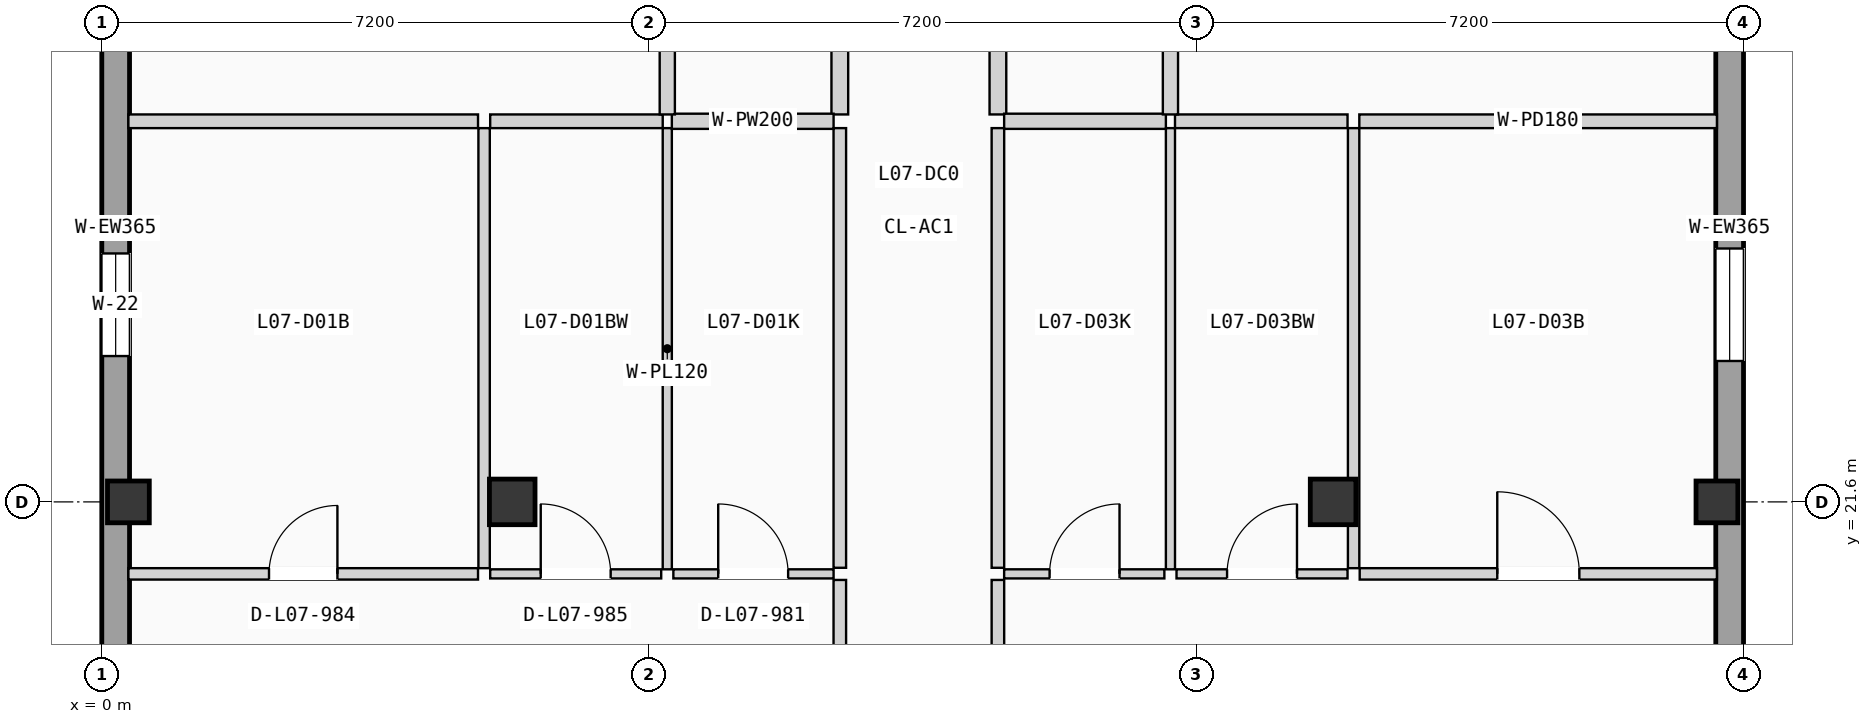
"""IFC4 building model, lengths in metres.
Left out: names, types, materials, properties, quantities, classifications, styles, units other than length and angle.
Written with IfcOpenShell. Run it as: python <this file> out.ifc"""

import sys

from ifc_helpers import new_model, si_unit, direction, frame, frame_2d, origin, origin_2d, place, context, subcontext, project, spatial, rectangle, extrude, element, fill, save


model = new_model("IFC4")
c1 = context("Model", 3, precision=1e-05, world=origin(), true_north=direction((0.0, 1.0)))
c2 = subcontext(c1, "Body", "Model", "MODEL_VIEW")
j1 = project(units=[si_unit("LENGTHUNIT", "METRE"), si_unit("PLANEANGLEUNIT", "RADIAN")], contexts=[c1])
p1 = place(None, origin())
s1 = spatial("IfcSite", under=j1, at=p1, CompositionType="ELEMENT")
p2 = place(p1, origin())
s2 = spatial("IfcBuilding", under=s1, at=p2, CompositionType="ELEMENT")
p3 = place(p2, frame((0.0, 0.0, 24.675)))
s3 = spatial("IfcBuildingStorey", under=s2, at=p3, CompositionType="ELEMENT", Elevation=24.675)
p4 = place(p3, frame((0.35, 21.6, 0.0), z_axis=(0.0, 0.0, 1.0), x_axis=(1.0, 0.0, 0.0)))
e1 = element("IfcColumn", 1, at=p4, inside=s3, PredefinedType="COLUMN", context=c2, shape_type="SweptSolid", body=[
    extrude(rectangle(XDim=0.55, YDim=0.55, at=origin_2d()), origin(), (0.0, 0.0, 1.0), 3.15),
])
for number, where, z_axis, x_axis in (
    (2, (5.4, 21.6, 0.0), (0.0, 0.0, 1.0), (1.0, 0.0, 0.0)),
    (3, (16.2, 21.6, 0.0), (0.0, 0.0, 1.0), (1.0, 0.0, 0.0)),
):
    element("IfcColumn", number, at=place(p3, frame(where, z_axis=z_axis, x_axis=x_axis)), inside=s3, PredefinedType="COLUMN", context=c2, shape_type="SweptSolid", body=[
        extrude(rectangle(XDim=0.6, YDim=0.6, at=origin_2d()), origin(), (0.0, 0.0, 1.0), 3.15),
    ])
p5 = place(p3, frame((21.25, 21.6, 0.0), z_axis=(0.0, 0.0, 1.0), x_axis=(1.0, 0.0, 0.0)))
e4 = element("IfcColumn", 4, at=p5, inside=s3, PredefinedType="COLUMN", context=c2, shape_type="SweptSolid", body=[
    extrude(rectangle(XDim=0.55, YDim=0.55, at=origin_2d()), origin(), (0.0, 0.0, 1.0), 3.15),
])
p6 = place(p3, frame((0.183, 0.365, 0.0), z_axis=(0.0, 0.0, 1.0), x_axis=(0.0, 1.0, 0.0)))
e5 = element("IfcWall", 5, at=p6, inside=s3, PredefinedType="SOLIDWALL", context=c2, shape_type="SweptSolid", body=[
    extrude(rectangle(XDim=49.67, YDim=0.365, at=frame_2d((24.835, 0.0))), origin(), (0.0, 0.0, 1.0), 2.6),
])
p7 = place(p6, frame((16.782, 0.0, 0.85)))
e6 = element("IfcOpeningElement", 6, at=p7, cuts=e5, PredefinedType="OPENING", context=c2, shape_type="SweptSolid", body=[
    extrude(rectangle(XDim=0.95, YDim=1.2, at=frame_2d((0.475, 0.6))), frame((0.0, 0.192, 0.0), z_axis=(0.0, -1.0, 0.0), x_axis=(1.0, 0.0, 0.0)), (0.0, 0.0, 1.0), 0.385),
])
p8 = place(p6, frame((9.452, 0.0, 0.9)))
e7 = element("IfcOpeningElement", 7, at=p8, cuts=e5, PredefinedType="OPENING", context=c2, shape_type="SweptSolid", body=[
    extrude(rectangle(XDim=1.35, YDim=1.2, at=frame_2d((0.675, 0.6))), frame((0.0, 0.192, 0.0), z_axis=(0.0, -1.0, 0.0), x_axis=(1.0, 0.0, 0.0)), (0.0, 0.0, 1.0), 0.385),
])
p9 = place(p6, frame((23.154, 0.0, 0.815)))
e8 = element("IfcOpeningElement", 8, at=p9, cuts=e5, PredefinedType="OPENING", context=c2, shape_type="SweptSolid", body=[
    extrude(rectangle(XDim=1.35, YDim=1.35, at=frame_2d((0.675, 0.675))), frame((0.0, 0.192, 0.0), z_axis=(0.0, -1.0, 0.0), x_axis=(1.0, 0.0, 0.0)), (0.0, 0.0, 1.0), 0.385),
])
p10 = place(p6, frame((32.71, 0.0, 0.665)))
e9 = element("IfcOpeningElement", 9, at=p10, cuts=e5, PredefinedType="OPENING", context=c2, shape_type="SweptSolid", body=[
    extrude(rectangle(XDim=1.35, YDim=1.5, at=frame_2d((0.675, 0.75))), frame((0.0, 0.192, 0.0), z_axis=(0.0, -1.0, 0.0), x_axis=(1.0, 0.0, 0.0)), (0.0, 0.0, 1.0), 0.385),
])
p11 = place(p6, frame((29.3, 0.0, 0.515)))
e10 = element("IfcOpeningElement", 10, at=p11, cuts=e5, PredefinedType="OPENING", context=c2, shape_type="SweptSolid", body=[
    extrude(rectangle(XDim=1.35, YDim=1.65, at=frame_2d((0.675, 0.825))), frame((0.0, 0.192, 0.0), z_axis=(0.0, -1.0, 0.0), x_axis=(1.0, 0.0, 0.0)), (0.0, 0.0, 1.0), 0.385),
])
p12 = place(p6, frame((39.504, 0.0, 0.85)))
e11 = element("IfcOpeningElement", 11, at=p12, cuts=e5, PredefinedType="OPENING", context=c2, shape_type="SweptSolid", body=[
    extrude(rectangle(XDim=0.95, YDim=1.2, at=frame_2d((0.475, 0.6))), frame((0.0, 0.192, 0.0), z_axis=(0.0, -1.0, 0.0), x_axis=(1.0, 0.0, 0.0)), (0.0, 0.0, 1.0), 0.385),
])
p13 = place(p3, frame((21.417, 0.365, 0.0), z_axis=(0.0, 0.0, 1.0), x_axis=(0.0, 1.0, 0.0)))
e12 = element("IfcWall", 12, at=p13, inside=s3, PredefinedType="SOLIDWALL", context=c2, shape_type="SweptSolid", body=[
    extrude(rectangle(XDim=49.67, YDim=0.365, at=frame_2d((24.835, 0.0))), origin(), (0.0, 0.0, 1.0), 2.6),
])
p14 = place(p13, frame((16.517, 0.0, 0.9)))
e13 = element("IfcOpeningElement", 13, at=p14, cuts=e12, PredefinedType="OPENING", context=c2, shape_type="SweptSolid", body=[
    extrude(rectangle(XDim=1.48, YDim=1.2, at=frame_2d((0.74, 0.6))), frame((0.0, 0.192, 0.0), z_axis=(0.0, -1.0, 0.0), x_axis=(1.0, 0.0, 0.0)), (0.0, 0.0, 1.0), 0.385),
])
p15 = place(p13, frame((9.387, 0.0, 0.815)))
e14 = element("IfcOpeningElement", 14, at=p15, cuts=e12, PredefinedType="OPENING", context=c2, shape_type="SweptSolid", body=[
    extrude(rectangle(XDim=1.48, YDim=1.35, at=frame_2d((0.74, 0.675))), frame((0.0, 0.192, 0.0), z_axis=(0.0, -1.0, 0.0), x_axis=(1.0, 0.0, 0.0)), (0.0, 0.0, 1.0), 0.385),
])
p16 = place(p13, frame((23.089, 0.0, 0.665)))
e15 = element("IfcOpeningElement", 15, at=p16, cuts=e12, PredefinedType="OPENING", context=c2, shape_type="SweptSolid", body=[
    extrude(rectangle(XDim=1.48, YDim=1.5, at=frame_2d((0.74, 0.75))), frame((0.0, 0.192, 0.0), z_axis=(0.0, -1.0, 0.0), x_axis=(1.0, 0.0, 0.0)), (0.0, 0.0, 1.0), 0.385),
])
p17 = place(p13, frame((32.645, 0.0, 0.515)))
e16 = element("IfcOpeningElement", 16, at=p17, cuts=e12, PredefinedType="OPENING", context=c2, shape_type="SweptSolid", body=[
    extrude(rectangle(XDim=1.48, YDim=1.65, at=frame_2d((0.74, 0.825))), frame((0.0, 0.192, 0.0), z_axis=(0.0, -1.0, 0.0), x_axis=(1.0, 0.0, 0.0)), (0.0, 0.0, 1.0), 0.385),
])
p18 = place(p13, frame((29.5, 0.0, 0.85)))
e17 = element("IfcOpeningElement", 17, at=p18, cuts=e12, PredefinedType="OPENING", context=c2, shape_type="SweptSolid", body=[
    extrude(rectangle(XDim=0.95, YDim=1.2, at=frame_2d((0.475, 0.6))), frame((0.0, 0.192, 0.0), z_axis=(0.0, -1.0, 0.0), x_axis=(1.0, 0.0, 0.0)), (0.0, 0.0, 1.0), 0.385),
])
p19 = place(p13, frame((39.179, 0.0, 0.9)))
e18 = element("IfcOpeningElement", 18, at=p19, cuts=e12, PredefinedType="OPENING", context=c2, shape_type="SweptSolid", body=[
    extrude(rectangle(XDim=1.6, YDim=1.2, at=frame_2d((0.8, 0.6))), frame((0.0, 0.192, 0.0), z_axis=(0.0, -1.0, 0.0), x_axis=(1.0, 0.0, 0.0)), (0.0, 0.0, 1.0), 0.385),
])
p20 = place(p3, frame((9.71, 13.545, 0.0), z_axis=(0.0, 0.0, 1.0), x_axis=(0.0, 1.0, 0.0)))
e19 = element("IfcWall", 19, at=p20, inside=s3, PredefinedType="PARTITIONING", context=c2, shape_type="SweptSolid", body=[
    extrude(rectangle(XDim=7.028, YDim=0.165, at=frame_2d((3.514, 0.0))), origin(), (0.0, 0.0, 1.0), 2.87),
])
p21 = place(p20, frame((3.009, 0.0, 0.0)))
e20 = element("IfcOpeningElement", 20, at=p21, cuts=e19, PredefinedType="OPENING", context=c2, shape_type="SweptSolid", body=[
    extrude(rectangle(XDim=1.01, YDim=2.11, at=frame_2d((0.505, 1.055))), frame((0.0, 0.093, 0.0), z_axis=(0.0, -1.0, 0.0), x_axis=(1.0, 0.0, 0.0)), (0.0, 0.0, 1.0), 0.185),
])
p22 = place(p3, frame((9.71, 20.733, 0.0), z_axis=(0.0, 0.0, 1.0), x_axis=(0.0, 1.0, 0.0)))
e21 = element("IfcWall", 21, at=p22, inside=s3, PredefinedType="PARTITIONING", context=c2, shape_type="SweptSolid", body=[
    extrude(rectangle(XDim=5.785, YDim=0.165, at=frame_2d((2.893, 0.0))), origin(), (0.0, 0.0, 1.0), 2.87),
])
p23 = place(p3, frame((9.71, 26.698, 0.0), z_axis=(0.0, 0.0, 1.0), x_axis=(0.0, 1.0, 0.0)))
e22 = element("IfcWall", 22, at=p23, inside=s3, PredefinedType="PLUMBINGWALL", context=c2, shape_type="SweptSolid", body=[
    extrude(rectangle(XDim=4.912, YDim=0.22, at=frame_2d((2.456, 0.0))), origin(), (0.0, 0.0, 1.0), 2.87),
])
p24 = place(p3, frame((11.79, 13.545, 0.0), z_axis=(0.0, 0.0, 1.0), x_axis=(0.0, 1.0, 0.0)))
e23 = element("IfcWall", 23, at=p24, inside=s3, PredefinedType="PARTITIONING", context=c2, shape_type="SweptSolid", body=[
    extrude(rectangle(XDim=7.028, YDim=0.165, at=frame_2d((3.514, 0.0))), origin(), (0.0, 0.0, 1.0), 2.87),
])
p25 = place(p24, frame((3.009, 0.0, 0.0)))
e24 = element("IfcOpeningElement", 24, at=p25, cuts=e23, PredefinedType="OPENING", context=c2, shape_type="SweptSolid", body=[
    extrude(rectangle(XDim=1.01, YDim=2.11, at=frame_2d((0.505, 1.055))), frame((0.0, 0.093, 0.0), z_axis=(0.0, -1.0, 0.0), x_axis=(1.0, 0.0, 0.0)), (0.0, 0.0, 1.0), 0.185),
])
p26 = place(p3, frame((11.79, 20.733, 0.0), z_axis=(0.0, 0.0, 1.0), x_axis=(0.0, 1.0, 0.0)))
e25 = element("IfcWall", 25, at=p26, inside=s3, PredefinedType="PARTITIONING", context=c2, shape_type="SweptSolid", body=[
    extrude(rectangle(XDim=5.785, YDim=0.165, at=frame_2d((2.893, 0.0))), origin(), (0.0, 0.0, 1.0), 2.87),
])
p27 = place(p3, frame((11.79, 26.698, 0.0), z_axis=(0.0, 0.0, 1.0), x_axis=(0.0, 1.0, 0.0)))
e26 = element("IfcWall", 26, at=p27, inside=s3, PredefinedType="PLUMBINGWALL", context=c2, shape_type="SweptSolid", body=[
    extrude(rectangle(XDim=4.912, YDim=0.22, at=frame_2d((2.456, 0.0))), origin(), (0.0, 0.0, 1.0), 2.87),
])
p28 = place(p3, frame((7.52, 20.653, 0.0), z_axis=(0.0, 0.0, 1.0), x_axis=(1.0, 0.0, 0.0)))
e27 = element("IfcWall", 27, at=p28, inside=s3, PredefinedType="PARTITIONING", context=c2, shape_type="SweptSolid", body=[
    extrude(rectangle(XDim=2.108, YDim=0.12, at=frame_2d((1.054, 0.0))), origin(), (0.0, 0.0, 1.0), 2.87),
])
p29 = place(p28, frame((0.59, 0.0, 0.0)))
e28 = element("IfcOpeningElement", 28, at=p29, cuts=e27, PredefinedType="OPENING", context=c2, shape_type="SweptSolid", body=[
    extrude(rectangle(XDim=0.92, YDim=2.02, at=frame_2d((0.46, 1.01))), frame((0.0, 0.07, 0.0), z_axis=(0.0, -1.0, 0.0), x_axis=(1.0, 0.0, 0.0)), (0.0, 0.0, 1.0), 0.14),
])
p30 = place(p3, frame((0.35, 20.653, 0.0), z_axis=(0.0, 0.0, 1.0), x_axis=(1.0, 0.0, 0.0)))
e29 = element("IfcWall", 29, at=p30, inside=s3, PredefinedType="PARTITIONING", context=c2, shape_type="SweptSolid", body=[
    extrude(rectangle(XDim=4.6, YDim=0.15, at=frame_2d((2.3, 0.0))), origin(), (0.0, 0.0, 1.0), 2.87),
])
p31 = place(p30, frame((1.85, 0.0, 0.0)))
e30 = element("IfcOpeningElement", 30, at=p31, cuts=e29, PredefinedType="OPENING", context=c2, shape_type="SweptSolid", body=[
    extrude(rectangle(XDim=0.9, YDim=2.04, at=frame_2d((0.45, 1.02))), frame((0.0, 0.085, 0.0), z_axis=(0.0, -1.0, 0.0), x_axis=(1.0, 0.0, 0.0)), (0.0, 0.0, 1.0), 0.17),
])
p32 = place(p3, frame((5.11, 20.653, 0.0), z_axis=(0.0, 0.0, 1.0), x_axis=(1.0, 0.0, 0.0)))
e31 = element("IfcWall", 31, at=p32, inside=s3, PredefinedType="PARTITIONING", context=c2, shape_type="SweptSolid", body=[
    extrude(rectangle(XDim=2.25, YDim=0.12, at=frame_2d((1.125, 0.0))), origin(), (0.0, 0.0, 1.0), 2.87),
])
p33 = place(p32, frame((0.665, 0.0, 0.0)))
e32 = element("IfcOpeningElement", 32, at=p33, cuts=e31, PredefinedType="OPENING", context=c2, shape_type="SweptSolid", body=[
    extrude(rectangle(XDim=0.92, YDim=2.02, at=frame_2d((0.46, 1.01))), frame((0.0, 0.07, 0.0), z_axis=(0.0, -1.0, 0.0), x_axis=(1.0, 0.0, 0.0)), (0.0, 0.0, 1.0), 0.14),
])
p34 = place(p3, frame((7.44, 20.713, 0.0), z_axis=(0.0, 0.0, 1.0), x_axis=(0.0, 1.0, 0.0)))
e33 = element("IfcWall", 33, at=p34, inside=s3, PredefinedType="PARTITIONING", context=c2, shape_type="SweptSolid", body=[
    extrude(rectangle(XDim=5.805, YDim=0.12, at=frame_2d((2.903, 0.0))), origin(), (0.0, 0.0, 1.0), 2.87),
])
p35 = place(p3, frame((7.5, 26.608, 0.0), z_axis=(0.0, 0.0, 1.0), x_axis=(1.0, 0.0, 0.0)))
e34 = element("IfcWall", 34, at=p35, inside=s3, PredefinedType="PLUMBINGWALL", context=c2, shape_type="SweptSolid", body=[
    extrude(rectangle(XDim=2.128, YDim=0.2, at=frame_2d((1.064, 0.0))), origin(), (0.0, 0.0, 1.0), 2.87),
])
p36 = place(p3, frame((5.03, 20.728, 0.0), z_axis=(0.0, 0.0, 1.0), x_axis=(0.0, 1.0, 0.0)))
e35 = element("IfcWall", 35, at=p36, inside=s3, PredefinedType="PARTITIONING", context=c2, shape_type="SweptSolid", body=[
    extrude(rectangle(XDim=5.79, YDim=0.15, at=frame_2d((2.895, 0.0))), origin(), (0.0, 0.0, 1.0), 2.87),
])
p37 = place(p3, frame((0.35, 26.608, 0.0), z_axis=(0.0, 0.0, 1.0), x_axis=(1.0, 0.0, 0.0)))
e36 = element("IfcWall", 36, at=p37, inside=s3, PredefinedType="PARTITIONING", context=c2, shape_type="SweptSolid", body=[
    extrude(rectangle(XDim=4.6, YDim=0.18, at=frame_2d((2.3, 0.0))), origin(), (0.0, 0.0, 1.0), 2.87),
])
p38 = place(p3, frame((5.11, 26.608, 0.0), z_axis=(0.0, 0.0, 1.0), x_axis=(1.0, 0.0, 0.0)))
e37 = element("IfcWall", 37, at=p38, inside=s3, PredefinedType="PARTITIONING", context=c2, shape_type="SweptSolid", body=[
    extrude(rectangle(XDim=2.27, YDim=0.18, at=frame_2d((1.135, 0.0))), origin(), (0.0, 0.0, 1.0), 2.87),
])
p39 = place(p3, frame((7.44, 26.698, 0.0), z_axis=(0.0, 0.0, 1.0), x_axis=(0.0, 1.0, 0.0)))
e38 = element("IfcWall", 38, at=p39, inside=s3, PredefinedType="PLUMBINGWALL", context=c2, shape_type="SweptSolid", body=[
    extrude(rectangle(XDim=4.917, YDim=0.2, at=frame_2d((2.458, 0.0))), origin(), (0.0, 0.0, 1.0), 2.87),
])
p40 = place(p3, frame((11.872, 20.653, 0.0), z_axis=(0.0, 0.0, 1.0), x_axis=(1.0, 0.0, 0.0)))
e39 = element("IfcWall", 39, at=p40, inside=s3, PredefinedType="PARTITIONING", context=c2, shape_type="SweptSolid", body=[
    extrude(rectangle(XDim=2.108, YDim=0.12, at=frame_2d((1.054, 0.0))), origin(), (0.0, 0.0, 1.0), 2.87),
])
p41 = place(p40, frame((0.598, 0.0, 0.0)))
e40 = element("IfcOpeningElement", 40, at=p41, cuts=e39, PredefinedType="OPENING", context=c2, shape_type="SweptSolid", body=[
    extrude(rectangle(XDim=0.92, YDim=2.02, at=frame_2d((0.46, 1.01))), frame((0.0, 0.07, 0.0), z_axis=(0.0, -1.0, 0.0), x_axis=(1.0, 0.0, 0.0)), (0.0, 0.0, 1.0), 0.14),
])
p42 = place(p3, frame((16.55, 20.653, 0.0), z_axis=(0.0, 0.0, 1.0), x_axis=(1.0, 0.0, 0.0)))
e41 = element("IfcWall", 41, at=p42, inside=s3, PredefinedType="PARTITIONING", context=c2, shape_type="SweptSolid", body=[
    extrude(rectangle(XDim=4.7, YDim=0.15, at=frame_2d((2.35, 0.0))), origin(), (0.0, 0.0, 1.0), 2.87),
])
p43 = place(p42, frame((1.81, 0.0, 0.0)))
e42 = element("IfcOpeningElement", 42, at=p43, cuts=e41, PredefinedType="OPENING", context=c2, shape_type="SweptSolid", body=[
    extrude(rectangle(XDim=1.08, YDim=2.1, at=frame_2d((0.54, 1.05))), frame((0.0, 0.085, 0.0), z_axis=(0.0, -1.0, 0.0), x_axis=(1.0, 0.0, 0.0)), (0.0, 0.0, 1.0), 0.17),
])
p44 = place(p3, frame((14.14, 20.653, 0.0), z_axis=(0.0, 0.0, 1.0), x_axis=(1.0, 0.0, 0.0)))
e43 = element("IfcWall", 43, at=p44, inside=s3, PredefinedType="PARTITIONING", context=c2, shape_type="SweptSolid", body=[
    extrude(rectangle(XDim=2.25, YDim=0.12, at=frame_2d((1.125, 0.0))), origin(), (0.0, 0.0, 1.0), 2.87),
])
p45 = place(p44, frame((0.665, 0.0, 0.0)))
e44 = element("IfcOpeningElement", 44, at=p45, cuts=e43, PredefinedType="OPENING", context=c2, shape_type="SweptSolid", body=[
    extrude(rectangle(XDim=0.92, YDim=2.02, at=frame_2d((0.46, 1.01))), frame((0.0, 0.07, 0.0), z_axis=(0.0, -1.0, 0.0), x_axis=(1.0, 0.0, 0.0)), (0.0, 0.0, 1.0), 0.14),
])
p46 = place(p3, frame((14.06, 20.713, 0.0), z_axis=(0.0, 0.0, 1.0), x_axis=(0.0, 1.0, 0.0)))
e45 = element("IfcWall", 45, at=p46, inside=s3, PredefinedType="PARTITIONING", context=c2, shape_type="SweptSolid", body=[
    extrude(rectangle(XDim=5.805, YDim=0.12, at=frame_2d((2.903, 0.0))), origin(), (0.0, 0.0, 1.0), 2.87),
])
p47 = place(p3, frame((11.872, 26.608, 0.0), z_axis=(0.0, 0.0, 1.0), x_axis=(1.0, 0.0, 0.0)))
e46 = element("IfcWall", 46, at=p47, inside=s3, PredefinedType="PLUMBINGWALL", context=c2, shape_type="SweptSolid", body=[
    extrude(rectangle(XDim=2.128, YDim=0.2, at=frame_2d((1.064, 0.0))), origin(), (0.0, 0.0, 1.0), 2.87),
])
p48 = place(p3, frame((16.47, 20.728, 0.0), z_axis=(0.0, 0.0, 1.0), x_axis=(0.0, 1.0, 0.0)))
e47 = element("IfcWall", 47, at=p48, inside=s3, PredefinedType="PARTITIONING", context=c2, shape_type="SweptSolid", body=[
    extrude(rectangle(XDim=5.79, YDim=0.15, at=frame_2d((2.895, 0.0))), origin(), (0.0, 0.0, 1.0), 2.87),
])
p49 = place(p3, frame((16.545, 26.608, 0.0), z_axis=(0.0, 0.0, 1.0), x_axis=(1.0, 0.0, 0.0)))
e48 = element("IfcWall", 48, at=p49, inside=s3, PredefinedType="PARTITIONING", context=c2, shape_type="SweptSolid", body=[
    extrude(rectangle(XDim=4.705, YDim=0.18, at=frame_2d((2.353, 0.0))), origin(), (0.0, 0.0, 1.0), 2.87),
])
p50 = place(p3, frame((14.12, 26.608, 0.0), z_axis=(0.0, 0.0, 1.0), x_axis=(1.0, 0.0, 0.0)))
e49 = element("IfcWall", 49, at=p50, inside=s3, PredefinedType="PARTITIONING", context=c2, shape_type="SweptSolid", body=[
    extrude(rectangle(XDim=2.27, YDim=0.18, at=frame_2d((1.135, 0.0))), origin(), (0.0, 0.0, 1.0), 2.87),
])
p51 = place(p3, frame((14.06, 26.698, 0.0), z_axis=(0.0, 0.0, 1.0), x_axis=(0.0, 1.0, 0.0)))
e50 = element("IfcWall", 50, at=p51, inside=s3, PredefinedType="PLUMBINGWALL", context=c2, shape_type="SweptSolid", body=[
    extrude(rectangle(XDim=4.917, YDim=0.2, at=frame_2d((2.458, 0.0))), origin(), (0.0, 0.0, 1.0), 2.87),
])
p52 = place(p9, origin())
e51 = element("IfcWindow", 51, at=p52, inside=s3, PartitioningType="SINGLE_PANEL", PredefinedType="WINDOW", context=c2, shape_type="SweptSolid", body=[
    extrude(rectangle(XDim=1.35, YDim=1.35, at=frame_2d((0.675, 0.675))), frame((0.0, 0.03, 0.0), z_axis=(0.0, -1.0, 0.0), x_axis=(1.0, 0.0, 0.0)), (0.0, 0.0, 1.0), 0.06),
])
fill(e8, e51)
p53 = place(p16, origin())
e52 = element("IfcWindow", 52, at=p53, inside=s3, PartitioningType="SINGLE_PANEL", PredefinedType="WINDOW", context=c2, shape_type="SweptSolid", body=[
    extrude(rectangle(XDim=1.48, YDim=1.5, at=frame_2d((0.74, 0.75))), frame((0.0, 0.03, 0.0), z_axis=(0.0, -1.0, 0.0), x_axis=(1.0, 0.0, 0.0)), (0.0, 0.0, 1.0), 0.06),
])
fill(e15, e52)
p54 = place(p29, origin())
e53 = element("IfcDoor", 53, at=p54, inside=s3, OperationType="SINGLE_SWING_LEFT", PredefinedType="DOOR", context=c2, shape_type="SweptSolid", body=[
    extrude(rectangle(XDim=0.92, YDim=2.02, at=frame_2d((0.46, 1.01))), frame((0.0, 0.025, 0.0), z_axis=(0.0, -1.0, 0.0), x_axis=(1.0, 0.0, 0.0)), (0.0, 0.0, 1.0), 0.05),
])
fill(e28, e53)
p55 = place(p31, origin())
e54 = element("IfcDoor", 54, at=p55, inside=s3, OperationType="SINGLE_SWING_RIGHT", PredefinedType="DOOR", context=c2, shape_type="SweptSolid", body=[
    extrude(rectangle(XDim=0.9, YDim=2.04, at=frame_2d((0.45, 1.02))), frame((0.0, 0.025, 0.0), z_axis=(0.0, -1.0, 0.0), x_axis=(1.0, 0.0, 0.0)), (0.0, 0.0, 1.0), 0.05),
])
fill(e30, e54)
p56 = place(p33, origin())
e55 = element("IfcDoor", 55, at=p56, inside=s3, OperationType="SINGLE_SWING_LEFT", PredefinedType="DOOR", context=c2, shape_type="SweptSolid", body=[
    extrude(rectangle(XDim=0.92, YDim=2.02, at=frame_2d((0.46, 1.01))), frame((0.0, 0.025, 0.0), z_axis=(0.0, -1.0, 0.0), x_axis=(1.0, 0.0, 0.0)), (0.0, 0.0, 1.0), 0.05),
])
fill(e32, e55)
p57 = place(p41, origin())
e56 = element("IfcDoor", 56, at=p57, inside=s3, OperationType="SINGLE_SWING_RIGHT", PredefinedType="DOOR", context=c2, shape_type="SweptSolid", body=[
    extrude(rectangle(XDim=0.92, YDim=2.02, at=frame_2d((0.46, 1.01))), frame((0.0, 0.025, 0.0), z_axis=(0.0, -1.0, 0.0), x_axis=(1.0, 0.0, 0.0)), (0.0, 0.0, 1.0), 0.05),
])
fill(e40, e56)
p58 = place(p43, origin())
e57 = element("IfcDoor", 57, at=p58, inside=s3, OperationType="SINGLE_SWING_LEFT", PredefinedType="DOOR", context=c2, shape_type="SweptSolid", body=[
    extrude(rectangle(XDim=1.08, YDim=2.1, at=frame_2d((0.54, 1.05))), frame((0.0, 0.025, 0.0), z_axis=(0.0, -1.0, 0.0), x_axis=(1.0, 0.0, 0.0)), (0.0, 0.0, 1.0), 0.05),
])
fill(e42, e57)
p59 = place(p45, origin())
e58 = element("IfcDoor", 58, at=p59, inside=s3, OperationType="SINGLE_SWING_RIGHT", PredefinedType="DOOR", context=c2, shape_type="SweptSolid", body=[
    extrude(rectangle(XDim=0.92, YDim=2.02, at=frame_2d((0.46, 1.01))), frame((0.0, 0.025, 0.0), z_axis=(0.0, -1.0, 0.0), x_axis=(1.0, 0.0, 0.0)), (0.0, 0.0, 1.0), 0.05),
])
fill(e44, e58)
save(model, sys.argv[1])
